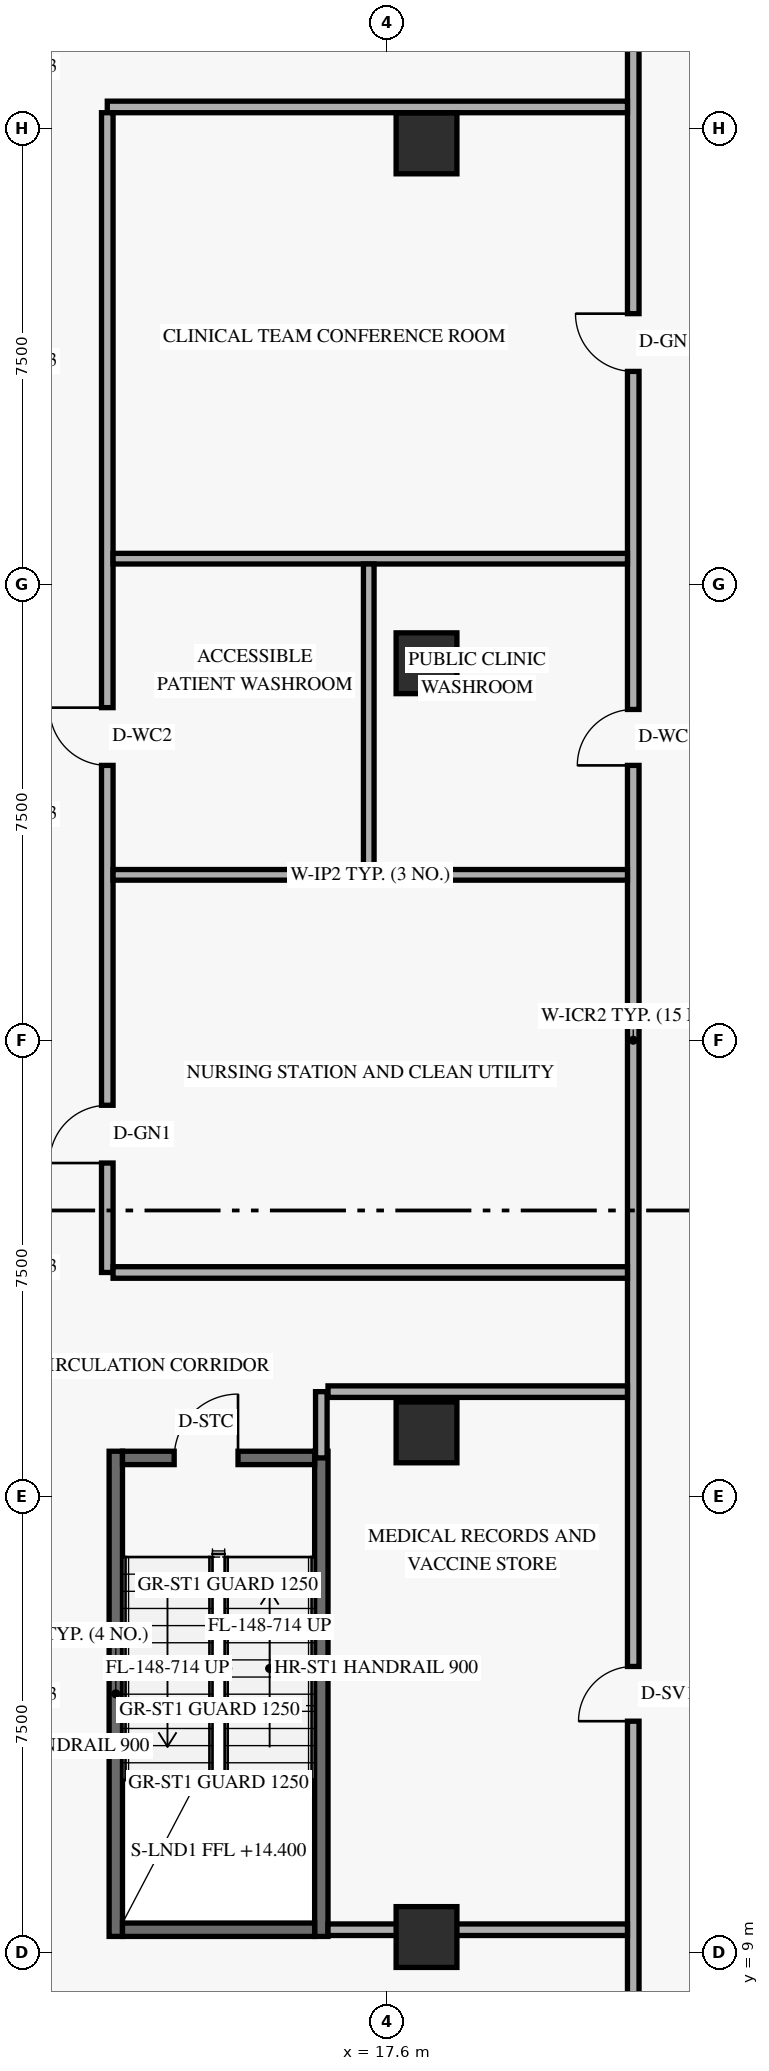
"""IFC4 building model, lengths in metres.
Left out: names, types, materials, properties, quantities, classifications, styles, units other than length and angle.
Written with IfcOpenShell. Run it as: python <this file> out.ifc"""

import sys

from ifc_helpers import new_model, si_unit, direction, frame, frame_2d, origin, origin_2d, place, context, subcontext, project, spatial, rectangle, extrude, element, fill, save


model = new_model("IFC4")
c1 = context("Model", 3, precision=1e-05, world=origin(), true_north=direction((0.0, 1.0)))
c2 = subcontext(c1, "Body", "Model", "MODEL_VIEW")
j1 = project(units=[si_unit("LENGTHUNIT", "METRE"), si_unit("PLANEANGLEUNIT", "RADIAN")], contexts=[c1])
p1 = place(None, origin())
s1 = spatial("IfcSite", under=j1, at=p1, CompositionType="ELEMENT")
p2 = place(p1, origin())
s2 = spatial("IfcBuilding", under=s1, at=p2, CompositionType="ELEMENT")
p3 = place(p2, frame((0.0, 0.0, 14.4)))
s3 = spatial("IfcBuildingStorey", under=s2, at=p3, CompositionType="ELEMENT", Elevation=14.4)
for number, where, z_axis, x_axis in (
    (1, (13.14, 9.26, 0.0), (0.0, 0.0, 1.0), (0.0, 1.0, 0.0)),
    (2, (16.52, 9.26, 0.0), (0.0, 0.0, 1.0), (0.0, 1.0, 0.0)),
):
    element("IfcWall", number, at=place(p3, frame(where, z_axis=z_axis, x_axis=x_axis)), inside=s3, PredefinedType="SHEAR", context=c2, shape_type="SweptSolid", body=[
        extrude(rectangle(XDim=7.98, YDim=0.22, at=frame_2d((3.99, 0.0))), origin(), (0.0, 0.0, 1.0), 4.39),
    ])
p4 = place(p3, frame((13.25, 9.37, 0.0), z_axis=(0.0, 0.0, 1.0), x_axis=(1.0, 0.0, 0.0)))
e3 = element("IfcWall", 3, at=p4, inside=s3, PredefinedType="SHEAR", context=c2, shape_type="SweptSolid", body=[
    extrude(rectangle(XDim=3.16, YDim=0.22, at=frame_2d((1.58, 0.0))), origin(), (0.0, 0.0, 1.0), 4.39),
])
p5 = place(p3, frame((13.25, 17.13, 0.0), z_axis=(0.0, 0.0, 1.0), x_axis=(1.0, 0.0, 0.0)))
e4 = element("IfcWall", 4, at=p5, inside=s3, PredefinedType="SHEAR", context=c2, shape_type="SweptSolid", body=[
    extrude(rectangle(XDim=3.16, YDim=0.22, at=frame_2d((1.58, 0.0))), origin(), (0.0, 0.0, 1.0), 4.39),
])
p6 = place(p5, frame((0.85, 0.0, 0.0)))
e5 = element("IfcOpeningElement", 5, at=p6, cuts=e4, PredefinedType="OPENING", context=c2, shape_type="SweptSolid", body=[
    extrude(rectangle(XDim=1.05, YDim=2.15, at=frame_2d((0.525, 1.075))), frame((0.0, 0.12, 0.0), z_axis=(0.0, -1.0, 0.0), x_axis=(1.0, 0.0, 0.0)), (0.0, 0.0, 1.0), 0.24),
])
for number, where, z_axis, x_axis in (
    (6, (18.25, 9.25, 0.0), (0.0, 0.0, 1.0), (1.0, 0.0, 0.0)),
    (7, (18.25, 17.55, 0.0), (0.0, 0.0, 1.0), (1.0, 0.0, 0.0)),
    (8, (18.25, 30.2, 0.0), (0.0, 0.0, 1.0), (1.0, 0.0, 0.0)),
    (9, (18.25, 38.75, 0.0), (0.0, 0.0, 1.0), (1.0, 0.0, 0.0)),
):
    element("IfcColumn", number, at=place(p3, frame(where, z_axis=z_axis, x_axis=x_axis)), inside=s3, PredefinedType="COLUMN", context=c2, shape_type="SweptSolid", body=[
        extrude(rectangle(XDim=1.0, YDim=1.0, at=origin_2d()), origin(), (0.0, 0.0, 1.0), 4.8),
    ])
p7 = place(p3, frame((21.65, 6.8, 0.0), z_axis=(0.0, 0.0, 1.0), x_axis=(0.0, 1.0, 0.0)))
e10 = element("IfcWall", 10, at=p7, inside=s3, PredefinedType="STANDARD", context=c2, shape_type="SweptSolid", body=[
    extrude(rectangle(XDim=34.4, YDim=0.19, at=frame_2d((17.2, 0.0))), origin(), (0.0, 0.0, 1.0), 3.445),
])
p8 = place(p7, frame((21.72, 0.0, 0.0)))
e11 = element("IfcOpeningElement", 11, at=p8, cuts=e10, PredefinedType="OPENING", context=c2, shape_type="SweptSolid", body=[
    extrude(rectangle(XDim=0.92, YDim=2.14, at=frame_2d((0.46, 1.07))), frame((0.0, 0.105, 0.0), z_axis=(0.0, -1.0, 0.0), x_axis=(1.0, 0.0, 0.0)), (0.0, 0.0, 1.0), 0.21),
])
p9 = place(p7, frame((28.2, 0.0, 0.0)))
e12 = element("IfcOpeningElement", 12, at=p9, cuts=e10, PredefinedType="OPENING", context=c2, shape_type="SweptSolid", body=[
    extrude(rectangle(XDim=0.95, YDim=2.15, at=frame_2d((0.475, 1.075))), frame((0.0, 0.105, 0.0), z_axis=(0.0, -1.0, 0.0), x_axis=(1.0, 0.0, 0.0)), (0.0, 0.0, 1.0), 0.21),
])
p10 = place(p7, frame((6.0, 0.0, 0.0)))
e13 = element("IfcOpeningElement", 13, at=p10, cuts=e10, PredefinedType="OPENING", context=c2, shape_type="SweptSolid", body=[
    extrude(rectangle(XDim=0.9, YDim=2.1, at=frame_2d((0.45, 1.05))), frame((0.0, 0.105, 0.0), z_axis=(0.0, -1.0, 0.0), x_axis=(1.0, 0.0, 0.0)), (0.0, 0.0, 1.0), 0.21),
])
p11 = place(p3, frame((16.63, 9.37, 0.0), z_axis=(0.0, 0.0, 1.0), x_axis=(1.0, 0.0, 0.0)))
e14 = element("IfcWall", 14, at=p11, inside=s3, PredefinedType="STANDARD", context=c2, shape_type="SweptSolid", body=[
    extrude(rectangle(XDim=4.925, YDim=0.19, at=frame_2d((2.462, 0.0))), origin(), (0.0, 0.0, 1.0), 3.445),
])
p12 = place(p3, frame((13.0, 39.35, 0.0), z_axis=(0.0, 0.0, 1.0), x_axis=(1.0, 0.0, 0.0)))
e15 = element("IfcWall", 15, at=p12, inside=s3, PredefinedType="STANDARD", context=c2, shape_type="SweptSolid", body=[
    extrude(rectangle(XDim=8.555, YDim=0.19, at=frame_2d((4.277, 0.0))), origin(), (0.0, 0.0, 1.0), 3.602),
])
p13 = place(p3, frame((13.0, 20.18, 0.0), z_axis=(0.0, 0.0, 1.0), x_axis=(0.0, 1.0, 0.0)))
e16 = element("IfcWall", 16, at=p13, inside=s3, PredefinedType="STANDARD", context=c2, shape_type="SweptSolid", body=[
    extrude(rectangle(XDim=19.075, YDim=0.19, at=frame_2d((9.538, 0.0))), origin(), (0.0, 0.0, 1.0), 3.445),
])
p14 = place(p13, frame((1.8, 0.0, 0.0)))
e17 = element("IfcOpeningElement", 17, at=p14, cuts=e16, PredefinedType="OPENING", context=c2, shape_type="SweptSolid", body=[
    extrude(rectangle(XDim=0.95, YDim=2.15, at=frame_2d((0.475, 1.075))), frame((0.0, 0.105, 0.0), z_axis=(0.0, -1.0, 0.0), x_axis=(1.0, 0.0, 0.0)), (0.0, 0.0, 1.0), 0.21),
])
p15 = place(p13, frame((8.34, 0.0, 0.0)))
e18 = element("IfcOpeningElement", 18, at=p15, cuts=e16, PredefinedType="OPENING", context=c2, shape_type="SweptSolid", body=[
    extrude(rectangle(XDim=0.95, YDim=2.14, at=frame_2d((0.475, 1.07))), frame((0.0, 0.105, 0.0), z_axis=(0.0, -1.0, 0.0), x_axis=(1.0, 0.0, 0.0)), (0.0, 0.0, 1.0), 0.21),
])
p16 = place(p3, frame((16.63, 18.22, 0.0), z_axis=(0.0, 0.0, 1.0), x_axis=(1.0, 0.0, 0.0)))
e19 = element("IfcWall", 19, at=p16, inside=s3, PredefinedType="STANDARD", context=c2, shape_type="SweptSolid", body=[
    extrude(rectangle(XDim=4.925, YDim=0.19, at=frame_2d((2.462, 0.0))), origin(), (0.0, 0.0, 1.0), 3.602),
])
p17 = place(p3, frame((16.52, 17.13, 0.0), z_axis=(0.0, 0.0, 1.0), x_axis=(0.0, 1.0, 0.0)))
e20 = element("IfcWall", 20, at=p17, inside=s3, PredefinedType="STANDARD", context=c2, shape_type="SweptSolid", body=[
    extrude(rectangle(XDim=1.09, YDim=0.19, at=frame_2d((0.545, 0.0))), origin(), (0.0, 0.0, 1.0), 3.445),
])
p18 = place(p3, frame((13.095, 20.18, 0.0), z_axis=(0.0, 0.0, 1.0), x_axis=(1.0, 0.0, 0.0)))
e21 = element("IfcWall", 21, at=p18, inside=s3, PredefinedType="STANDARD", context=c2, shape_type="SweptSolid", body=[
    extrude(rectangle(XDim=8.46, YDim=0.19, at=frame_2d((4.23, 0.0))), origin(), (0.0, 0.0, 1.0), 3.602),
])
for number, where, z_axis, x_axis in (
    (22, (13.095, 26.72, 0.0), (0.0, 0.0, 1.0), (1.0, 0.0, 0.0)),
    (23, (13.095, 31.92, 0.0), (0.0, 0.0, 1.0), (1.0, 0.0, 0.0)),
):
    element("IfcWall", number, at=place(p3, frame(where, z_axis=z_axis, x_axis=x_axis)), inside=s3, PredefinedType="PLUMBINGWALL", context=c2, shape_type="SweptSolid", body=[
        extrude(rectangle(XDim=8.46, YDim=0.175, at=frame_2d((4.23, 0.0))), origin(), (0.0, 0.0, 1.0), 3.602),
    ])
p19 = place(p3, frame((17.3, 26.808, 0.0), z_axis=(0.0, 0.0, 1.0), x_axis=(0.0, 1.0, 0.0)))
e24 = element("IfcWall", 24, at=p19, inside=s3, PredefinedType="PLUMBINGWALL", context=c2, shape_type="SweptSolid", body=[
    extrude(rectangle(XDim=5.025, YDim=0.175, at=frame_2d((2.512, 0.0))), origin(), (0.0, 0.0, 1.0), 3.445),
])
p20 = place(p6, frame((1.05, 0.0, 0.0), z_axis=(0.0, 0.0, 1.0), x_axis=(-1.0, 0.0, 0.0)))
e25 = element("IfcDoor", 25, at=p20, inside=s3, OperationType="SINGLE_SWING_LEFT", PredefinedType="DOOR", context=c2, shape_type="SweptSolid", body=[
    extrude(rectangle(XDim=1.05, YDim=2.15, at=frame_2d((0.525, 1.075))), frame((0.0, 0.025, 0.0), z_axis=(0.0, -1.0, 0.0), x_axis=(1.0, 0.0, 0.0)), (0.0, 0.0, 1.0), 0.05),
])
fill(e5, e25)
p21 = place(p14, origin())
e26 = element("IfcDoor", 26, at=p21, inside=s3, OperationType="SINGLE_SWING_LEFT", PredefinedType="DOOR", context=c2, shape_type="SweptSolid", body=[
    extrude(rectangle(XDim=0.95, YDim=2.15, at=frame_2d((0.475, 1.075))), frame((0.0, 0.025, 0.0), z_axis=(0.0, -1.0, 0.0), x_axis=(1.0, 0.0, 0.0)), (0.0, 0.0, 1.0), 0.05),
])
fill(e17, e26)
p22 = place(p15, origin())
e27 = element("IfcDoor", 27, at=p22, inside=s3, OperationType="SINGLE_SWING_RIGHT", PredefinedType="DOOR", context=c2, shape_type="SweptSolid", body=[
    extrude(rectangle(XDim=0.95, YDim=2.14, at=frame_2d((0.475, 1.07))), frame((0.0, 0.025, 0.0), z_axis=(0.0, -1.0, 0.0), x_axis=(1.0, 0.0, 0.0)), (0.0, 0.0, 1.0), 0.05),
])
fill(e18, e27)
p23 = place(p8, origin())
e28 = element("IfcDoor", 28, at=p23, inside=s3, OperationType="SINGLE_SWING_LEFT", PredefinedType="DOOR", context=c2, shape_type="SweptSolid", body=[
    extrude(rectangle(XDim=0.92, YDim=2.14, at=frame_2d((0.46, 1.07))), frame((0.0, 0.025, 0.0), z_axis=(0.0, -1.0, 0.0), x_axis=(1.0, 0.0, 0.0)), (0.0, 0.0, 1.0), 0.05),
])
fill(e11, e28)
p24 = place(p9, origin())
e29 = element("IfcDoor", 29, at=p24, inside=s3, OperationType="SINGLE_SWING_RIGHT", PredefinedType="DOOR", context=c2, shape_type="SweptSolid", body=[
    extrude(rectangle(XDim=0.95, YDim=2.15, at=frame_2d((0.475, 1.075))), frame((0.0, 0.025, 0.0), z_axis=(0.0, -1.0, 0.0), x_axis=(1.0, 0.0, 0.0)), (0.0, 0.0, 1.0), 0.05),
])
fill(e12, e29)
p25 = place(p10, origin())
e30 = element("IfcDoor", 30, at=p25, inside=s3, OperationType="SINGLE_SWING_LEFT", PredefinedType="DOOR", context=c2, shape_type="SweptSolid", body=[
    extrude(rectangle(XDim=0.9, YDim=2.1, at=frame_2d((0.45, 1.05))), frame((0.0, 0.025, 0.0), z_axis=(0.0, -1.0, 0.0), x_axis=(1.0, 0.0, 0.0)), (0.0, 0.0, 1.0), 0.05),
])
fill(e13, e30)
save(model, sys.argv[1])
